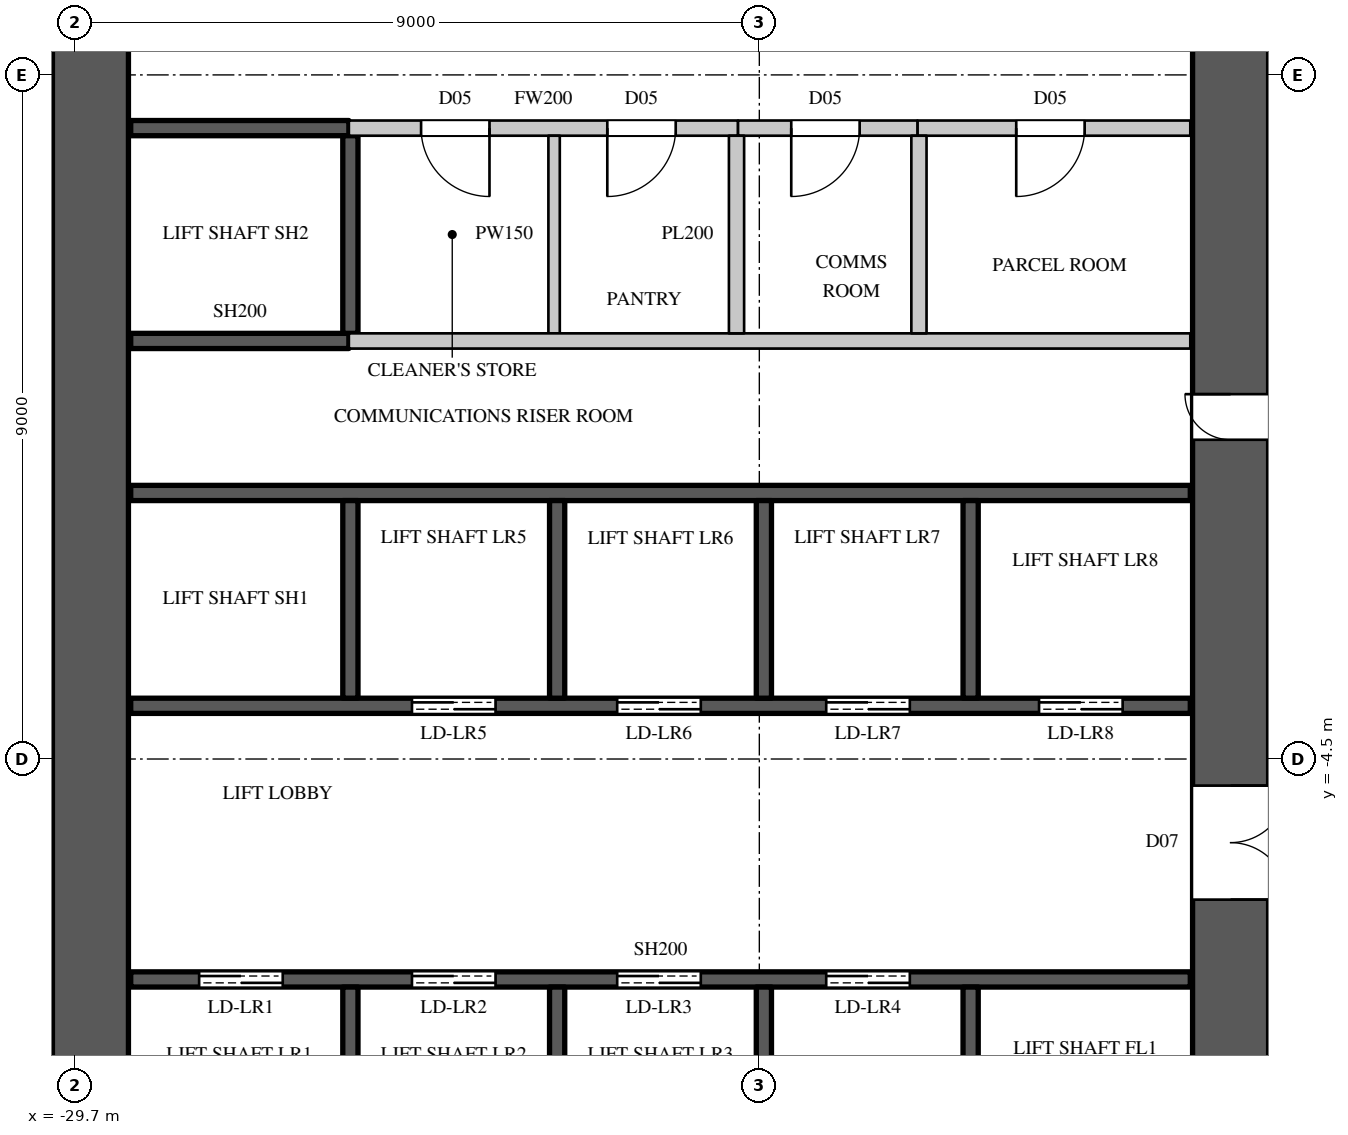
"""IFC4 building model, lengths in metres.
Left out: names, types, materials, properties, quantities, classifications, styles, units other than length and angle.
Written with IfcOpenShell. Run it as: python <this file> out.ifc"""

import sys

from ifc_helpers import new_model, si_unit, direction, frame, frame_2d, origin, place, context, subcontext, project, spatial, rectangle, extrude, element, fill, save


model = new_model("IFC4")
c1 = context("Model", 3, precision=1e-05, world=origin(), true_north=direction((0.0, 1.0)))
c2 = subcontext(c1, "Body", "Model", "MODEL_VIEW")
j1 = project(units=[si_unit("LENGTHUNIT", "METRE"), si_unit("PLANEANGLEUNIT", "RADIAN")], contexts=[c1])
p1 = place(None, origin())
s1 = spatial("IfcSite", under=j1, at=p1, CompositionType="ELEMENT")
p2 = place(p1, origin())
s2 = spatial("IfcBuilding", under=s1, at=p2, CompositionType="ELEMENT")
p3 = place(p2, frame((0.0, 0.0, 80.7)))
s3 = spatial("IfcBuildingStorey", under=s2, at=p3, CompositionType="ELEMENT", Elevation=80.7)
p4 = place(p3, frame((-14.5, -14.8, 0.0), z_axis=(0.0, 0.0, 1.0), x_axis=(0.0, 1.0, 0.0)))
e1 = element("IfcWall", 1, at=p4, inside=s3, PredefinedType="SHEAR", context=c2, shape_type="SweptSolid", body=[
    extrude(rectangle(XDim=29.6, YDim=1.0, at=frame_2d((14.8, 0.0))), origin(), (0.0, 0.0, 1.0), 3.6),
])
p5 = place(p4, frame((8.45, 0.0, 0.0)))
e2 = element("IfcOpeningElement", 2, at=p5, cuts=e1, PredefinedType="OPENING", context=c2, shape_type="SweptSolid", body=[
    extrude(rectangle(XDim=1.5, YDim=2.4, at=frame_2d((0.75, 1.2))), frame((0.0, 0.51, 0.0), z_axis=(0.0, -1.0, 0.0), x_axis=(1.0, 0.0, 0.0)), (0.0, 0.0, 1.0), 1.02),
])
p6 = place(p4, frame((19.65, 0.0, 0.0)))
e3 = element("IfcOpeningElement", 3, at=p6, cuts=e1, PredefinedType="OPENING", context=c2, shape_type="SweptSolid", body=[
    extrude(rectangle(XDim=1.5, YDim=2.4, at=frame_2d((0.75, 1.2))), frame((0.0, 0.51, 0.0), z_axis=(0.0, -1.0, 0.0), x_axis=(1.0, 0.0, 0.0)), (0.0, 0.0, 1.0), 1.02),
])
p7 = place(p4, frame((14.5, 0.0, 0.0)))
e4 = element("IfcOpeningElement", 4, at=p7, cuts=e1, PredefinedType="OPENING", context=c2, shape_type="SweptSolid", body=[
    extrude(rectangle(XDim=0.6, YDim=2.0, at=frame_2d((0.3, 1.0))), frame((0.0, 0.51, 0.0), z_axis=(0.0, -1.0, 0.0), x_axis=(1.0, 0.0, 0.0)), (0.0, 0.0, 1.0), 1.02),
])
p8 = place(p3, frame((-29.5, -10.2, 0.0), z_axis=(0.0, 0.0, 1.0), x_axis=(0.0, 1.0, 0.0)))
e5 = element("IfcWall", 5, at=p8, inside=s3, PredefinedType="SHEAR", context=c2, shape_type="SweptSolid", body=[
    extrude(rectangle(XDim=20.4, YDim=1.0, at=frame_2d((10.2, 0.0))), origin(), (0.0, 0.0, 1.0), 3.6),
])
p9 = place(p3, frame((-26.1, 3.8, 0.0), z_axis=(0.0, 0.0, 1.0), x_axis=(1.0, 0.0, 0.0)))
e6 = element("IfcWall", 6, at=p9, inside=s3, PredefinedType="PARTITIONING", context=c2, shape_type="SweptSolid", body=[
    extrude(rectangle(XDim=5.12, YDim=0.2, at=frame_2d((2.56, 0.0))), origin(), (0.0, 0.0, 1.0), 3.3),
])
p10 = place(p9, frame((0.95, 0.0, 0.0)))
e7 = element("IfcOpeningElement", 7, at=p10, cuts=e6, PredefinedType="OPENING", context=c2, shape_type="SweptSolid", body=[
    extrude(rectangle(XDim=0.9, YDim=2.2, at=frame_2d((0.45, 1.1))), frame((0.0, 0.11, 0.0), z_axis=(0.0, -1.0, 0.0), x_axis=(1.0, 0.0, 0.0)), (0.0, 0.0, 1.0), 0.22),
])
p11 = place(p9, frame((3.4, 0.0, 0.0)))
e8 = element("IfcOpeningElement", 8, at=p11, cuts=e6, PredefinedType="OPENING", context=c2, shape_type="SweptSolid", body=[
    extrude(rectangle(XDim=0.9, YDim=2.2, at=frame_2d((0.45, 1.1))), frame((0.0, 0.11, 0.0), z_axis=(0.0, -1.0, 0.0), x_axis=(1.0, 0.0, 0.0)), (0.0, 0.0, 1.0), 0.22),
])
p12 = place(p3, frame((-18.62, 3.8, 0.0), z_axis=(0.0, 0.0, 1.0), x_axis=(1.0, 0.0, 0.0)))
e9 = element("IfcWall", 9, at=p12, inside=s3, PredefinedType="PARTITIONING", context=c2, shape_type="SweptSolid", body=[
    extrude(rectangle(XDim=3.59, YDim=0.2, at=frame_2d((1.795, 0.0))), origin(), (0.0, 0.0, 1.0), 3.3),
])
p13 = place(p12, frame((1.3, 0.0, 0.0)))
e10 = element("IfcOpeningElement", 10, at=p13, cuts=e9, PredefinedType="OPENING", context=c2, shape_type="SweptSolid", body=[
    extrude(rectangle(XDim=0.9, YDim=2.2, at=frame_2d((0.45, 1.1))), frame((0.0, 0.11, 0.0), z_axis=(0.0, -1.0, 0.0), x_axis=(1.0, 0.0, 0.0)), (0.0, 0.0, 1.0), 0.22),
])
p14 = place(p3, frame((-23.4, 1.1, 0.0), z_axis=(0.0, 0.0, 1.0), x_axis=(0.0, 1.0, 0.0)))
e11 = element("IfcWall", 11, at=p14, inside=s3, PredefinedType="PARTITIONING", context=c2, shape_type="SweptSolid", body=[
    extrude(rectangle(XDim=2.6, YDim=0.15, at=frame_2d((1.3, 0.0))), origin(), (0.0, 0.0, 1.0), 3.3),
])
p15 = place(p3, frame((-26.1, 1.0, 0.0), z_axis=(0.0, 0.0, 1.0), x_axis=(1.0, 0.0, 0.0)))
e12 = element("IfcWall", 12, at=p15, inside=s3, PredefinedType="PARTITIONING", context=c2, shape_type="SweptSolid", body=[
    extrude(rectangle(XDim=11.07, YDim=0.2, at=frame_2d((5.535, 0.0))), origin(), (0.0, 0.0, 1.0), 3.3),
])
p16 = place(p3, frame((-20.98, 3.8, 0.0), z_axis=(0.0, 0.0, 1.0), x_axis=(1.0, 0.0, 0.0)))
e13 = element("IfcWall", 13, at=p16, inside=s3, PredefinedType="PARTITIONING", context=c2, shape_type="SweptSolid", body=[
    extrude(rectangle(XDim=2.36, YDim=0.2, at=frame_2d((1.18, 0.0))), origin(), (0.0, 0.0, 1.0), 3.3),
])
p17 = place(p16, frame((0.7, 0.0, 0.0)))
e14 = element("IfcOpeningElement", 14, at=p17, cuts=e13, PredefinedType="OPENING", context=c2, shape_type="SweptSolid", body=[
    extrude(rectangle(XDim=0.9, YDim=2.2, at=frame_2d((0.45, 1.1))), frame((0.0, 0.11, 0.0), z_axis=(0.0, -1.0, 0.0), x_axis=(1.0, 0.0, 0.0)), (0.0, 0.0, 1.0), 0.22),
])
for number, where, z_axis, x_axis in (
    (15, (-21.0, 1.1, 0.0), (0.0, 0.0, 1.0), (0.0, 1.0, 0.0)),
    (16, (-18.6, 1.1, 0.0), (0.0, 0.0, 1.0), (0.0, 1.0, 0.0)),
):
    element("IfcWall", number, at=place(p3, frame(where, z_axis=z_axis, x_axis=x_axis)), inside=s3, PredefinedType="PARTITIONING", context=c2, shape_type="SweptSolid", body=[
        extrude(rectangle(XDim=2.6, YDim=0.2, at=frame_2d((1.3, 0.0))), origin(), (0.0, 0.0, 1.0), 3.3),
    ])
p18 = place(p3, frame((-28.97, -7.4, 0.0), z_axis=(0.0, 0.0, 1.0), x_axis=(1.0, 0.0, 0.0)))
e17 = element("IfcWall", 17, at=p18, inside=s3, PredefinedType="SHEAR", context=c2, shape_type="SweptSolid", body=[
    extrude(rectangle(XDim=13.94, YDim=0.2, at=frame_2d((6.97, 0.0))), origin(), (0.0, 0.0, 1.0), 3.3),
])
p19 = place(p18, frame((0.9, 0.0, 0.0)))
e18 = element("IfcOpeningElement", 18, at=p19, cuts=e17, PredefinedType="OPENING", context=c2, shape_type="SweptSolid", body=[
    extrude(rectangle(XDim=1.1, YDim=2.2, at=frame_2d((0.55, 1.1))), frame((0.0, 0.11, 0.0), z_axis=(0.0, -1.0, 0.0), x_axis=(1.0, 0.0, 0.0)), (0.0, 0.0, 1.0), 0.22),
])
p20 = place(p18, frame((3.7, 0.0, 0.0)))
e19 = element("IfcOpeningElement", 19, at=p20, cuts=e17, PredefinedType="OPENING", context=c2, shape_type="SweptSolid", body=[
    extrude(rectangle(XDim=1.1, YDim=2.2, at=frame_2d((0.55, 1.1))), frame((0.0, 0.11, 0.0), z_axis=(0.0, -1.0, 0.0), x_axis=(1.0, 0.0, 0.0)), (0.0, 0.0, 1.0), 0.22),
])
p21 = place(p18, frame((6.4, 0.0, 0.0)))
e20 = element("IfcOpeningElement", 20, at=p21, cuts=e17, PredefinedType="OPENING", context=c2, shape_type="SweptSolid", body=[
    extrude(rectangle(XDim=1.1, YDim=2.2, at=frame_2d((0.55, 1.1))), frame((0.0, 0.11, 0.0), z_axis=(0.0, -1.0, 0.0), x_axis=(1.0, 0.0, 0.0)), (0.0, 0.0, 1.0), 0.22),
])
p22 = place(p18, frame((9.15, 0.0, 0.0)))
e21 = element("IfcOpeningElement", 21, at=p22, cuts=e17, PredefinedType="OPENING", context=c2, shape_type="SweptSolid", body=[
    extrude(rectangle(XDim=1.1, YDim=2.2, at=frame_2d((0.55, 1.1))), frame((0.0, 0.11, 0.0), z_axis=(0.0, -1.0, 0.0), x_axis=(1.0, 0.0, 0.0)), (0.0, 0.0, 1.0), 0.22),
])
p23 = place(p3, frame((-28.97, -3.8, 0.0), z_axis=(0.0, 0.0, 1.0), x_axis=(1.0, 0.0, 0.0)))
e22 = element("IfcWall", 22, at=p23, inside=s3, PredefinedType="SHEAR", context=c2, shape_type="SweptSolid", body=[
    extrude(rectangle(XDim=13.94, YDim=0.2, at=frame_2d((6.97, 0.0))), origin(), (0.0, 0.0, 1.0), 3.3),
])
p24 = place(p23, frame((3.7, 0.0, 0.0)))
e23 = element("IfcOpeningElement", 23, at=p24, cuts=e22, PredefinedType="OPENING", context=c2, shape_type="SweptSolid", body=[
    extrude(rectangle(XDim=1.1, YDim=2.2, at=frame_2d((0.55, 1.1))), frame((0.0, 0.11, 0.0), z_axis=(0.0, -1.0, 0.0), x_axis=(1.0, 0.0, 0.0)), (0.0, 0.0, 1.0), 0.22),
])
p25 = place(p23, frame((6.4, 0.0, 0.0)))
e24 = element("IfcOpeningElement", 24, at=p25, cuts=e22, PredefinedType="OPENING", context=c2, shape_type="SweptSolid", body=[
    extrude(rectangle(XDim=1.1, YDim=2.2, at=frame_2d((0.55, 1.1))), frame((0.0, 0.11, 0.0), z_axis=(0.0, -1.0, 0.0), x_axis=(1.0, 0.0, 0.0)), (0.0, 0.0, 1.0), 0.22),
])
p26 = place(p23, frame((9.15, 0.0, 0.0)))
e25 = element("IfcOpeningElement", 25, at=p26, cuts=e22, PredefinedType="OPENING", context=c2, shape_type="SweptSolid", body=[
    extrude(rectangle(XDim=1.1, YDim=2.2, at=frame_2d((0.55, 1.1))), frame((0.0, 0.11, 0.0), z_axis=(0.0, -1.0, 0.0), x_axis=(1.0, 0.0, 0.0)), (0.0, 0.0, 1.0), 0.22),
])
p27 = place(p23, frame((11.95, 0.0, 0.0)))
e26 = element("IfcOpeningElement", 26, at=p27, cuts=e22, PredefinedType="OPENING", context=c2, shape_type="SweptSolid", body=[
    extrude(rectangle(XDim=1.1, YDim=2.2, at=frame_2d((0.55, 1.1))), frame((0.0, 0.11, 0.0), z_axis=(0.0, -1.0, 0.0), x_axis=(1.0, 0.0, 0.0)), (0.0, 0.0, 1.0), 0.22),
])
p28 = place(p3, frame((-28.97, -1.0, 0.0), z_axis=(0.0, 0.0, 1.0), x_axis=(1.0, 0.0, 0.0)))
e27 = element("IfcWall", 27, at=p28, inside=s3, PredefinedType="SHEAR", context=c2, shape_type="SweptSolid", body=[
    extrude(rectangle(XDim=13.94, YDim=0.2, at=frame_2d((6.97, 0.0))), origin(), (0.0, 0.0, 1.0), 3.3),
])
for number, where, z_axis, x_axis in (
    (28, (-28.97, 1.0, 0.0), (0.0, 0.0, 1.0), (1.0, 0.0, 0.0)),
    (29, (-28.97, 3.8, 0.0), (0.0, 0.0, 1.0), (1.0, 0.0, 0.0)),
):
    element("IfcWall", number, at=place(p3, frame(where, z_axis=z_axis, x_axis=x_axis)), inside=s3, PredefinedType="SHEAR", context=c2, shape_type="SweptSolid", body=[
        extrude(rectangle(XDim=2.87, YDim=0.2, at=frame_2d((1.435, 0.0))), origin(), (0.0, 0.0, 1.0), 3.3),
    ])
p29 = place(p3, frame((-26.08, -10.075, 0.0), z_axis=(0.0, 0.0, 1.0), x_axis=(0.0, 1.0, 0.0)))
e30 = element("IfcWall", 30, at=p29, inside=s3, PredefinedType="SHEAR", context=c2, shape_type="SweptSolid", body=[
    extrude(rectangle(XDim=2.575, YDim=0.2, at=frame_2d((1.288, 0.0))), origin(), (0.0, 0.0, 1.0), 3.6),
])
p30 = place(p3, frame((-26.08, -3.7, 0.0), z_axis=(0.0, 0.0, 1.0), x_axis=(0.0, 1.0, 0.0)))
e31 = element("IfcWall", 31, at=p30, inside=s3, PredefinedType="SHEAR", context=c2, shape_type="SweptSolid", body=[
    extrude(rectangle(XDim=2.6, YDim=0.2, at=frame_2d((1.3, 0.0))), origin(), (0.0, 0.0, 1.0), 3.6),
])
p31 = place(p3, frame((-26.08, 1.1, 0.0), z_axis=(0.0, 0.0, 1.0), x_axis=(0.0, 1.0, 0.0)))
e32 = element("IfcWall", 32, at=p31, inside=s3, PredefinedType="SHEAR", context=c2, shape_type="SweptSolid", body=[
    extrude(rectangle(XDim=2.6, YDim=0.2, at=frame_2d((1.3, 0.0))), origin(), (0.0, 0.0, 1.0), 3.3),
])
p32 = place(p3, frame((-23.36, -10.075, 0.0), z_axis=(0.0, 0.0, 1.0), x_axis=(0.0, 1.0, 0.0)))
e33 = element("IfcWall", 33, at=p32, inside=s3, PredefinedType="SHEAR", context=c2, shape_type="SweptSolid", body=[
    extrude(rectangle(XDim=2.575, YDim=0.2, at=frame_2d((1.288, 0.0))), origin(), (0.0, 0.0, 1.0), 3.6),
])
p33 = place(p3, frame((-23.36, -3.7, 0.0), z_axis=(0.0, 0.0, 1.0), x_axis=(0.0, 1.0, 0.0)))
e34 = element("IfcWall", 34, at=p33, inside=s3, PredefinedType="SHEAR", context=c2, shape_type="SweptSolid", body=[
    extrude(rectangle(XDim=2.6, YDim=0.2, at=frame_2d((1.3, 0.0))), origin(), (0.0, 0.0, 1.0), 3.6),
])
p34 = place(p3, frame((-20.64, -10.075, 0.0), z_axis=(0.0, 0.0, 1.0), x_axis=(0.0, 1.0, 0.0)))
e35 = element("IfcWall", 35, at=p34, inside=s3, PredefinedType="SHEAR", context=c2, shape_type="SweptSolid", body=[
    extrude(rectangle(XDim=2.575, YDim=0.2, at=frame_2d((1.288, 0.0))), origin(), (0.0, 0.0, 1.0), 3.6),
])
p35 = place(p3, frame((-20.64, -3.7, 0.0), z_axis=(0.0, 0.0, 1.0), x_axis=(0.0, 1.0, 0.0)))
e36 = element("IfcWall", 36, at=p35, inside=s3, PredefinedType="SHEAR", context=c2, shape_type="SweptSolid", body=[
    extrude(rectangle(XDim=2.6, YDim=0.2, at=frame_2d((1.3, 0.0))), origin(), (0.0, 0.0, 1.0), 3.6),
])
p36 = place(p3, frame((-17.92, -10.1, 0.0), z_axis=(0.0, 0.0, 1.0), x_axis=(0.0, 1.0, 0.0)))
e37 = element("IfcWall", 37, at=p36, inside=s3, PredefinedType="SHEAR", context=c2, shape_type="SweptSolid", body=[
    extrude(rectangle(XDim=2.6, YDim=0.2, at=frame_2d((1.3, 0.0))), origin(), (0.0, 0.0, 1.0), 3.6),
])
p37 = place(p3, frame((-17.92, -3.7, 0.0), z_axis=(0.0, 0.0, 1.0), x_axis=(0.0, 1.0, 0.0)))
e38 = element("IfcWall", 38, at=p37, inside=s3, PredefinedType="SHEAR", context=c2, shape_type="SweptSolid", body=[
    extrude(rectangle(XDim=2.6, YDim=0.2, at=frame_2d((1.3, 0.0))), origin(), (0.0, 0.0, 1.0), 3.6),
])
p38 = place(p10, origin())
e39 = element("IfcDoor", 39, at=p38, inside=s3, OperationType="SINGLE_SWING_LEFT", PredefinedType="DOOR", context=c2, shape_type="SweptSolid", body=[
    extrude(rectangle(XDim=0.9, YDim=2.2, at=frame_2d((0.45, 1.1))), frame((0.0, 0.025, 0.0), z_axis=(0.0, -1.0, 0.0), x_axis=(1.0, 0.0, 0.0)), (0.0, 0.0, 1.0), 0.05),
])
fill(e7, e39)
p39 = place(p11, origin())
e40 = element("IfcDoor", 40, at=p39, inside=s3, OperationType="SINGLE_SWING_RIGHT", PredefinedType="DOOR", context=c2, shape_type="SweptSolid", body=[
    extrude(rectangle(XDim=0.9, YDim=2.2, at=frame_2d((0.45, 1.1))), frame((0.0, 0.025, 0.0), z_axis=(0.0, -1.0, 0.0), x_axis=(1.0, 0.0, 0.0)), (0.0, 0.0, 1.0), 0.05),
])
fill(e8, e40)
p40 = place(p17, origin())
e41 = element("IfcDoor", 41, at=p40, inside=s3, OperationType="SINGLE_SWING_RIGHT", PredefinedType="DOOR", context=c2, shape_type="SweptSolid", body=[
    extrude(rectangle(XDim=0.9, YDim=2.2, at=frame_2d((0.45, 1.1))), frame((0.0, 0.025, 0.0), z_axis=(0.0, -1.0, 0.0), x_axis=(1.0, 0.0, 0.0)), (0.0, 0.0, 1.0), 0.05),
])
fill(e14, e41)
p41 = place(p13, origin())
e42 = element("IfcDoor", 42, at=p41, inside=s3, OperationType="SINGLE_SWING_RIGHT", PredefinedType="DOOR", context=c2, shape_type="SweptSolid", body=[
    extrude(rectangle(XDim=0.9, YDim=2.2, at=frame_2d((0.45, 1.1))), frame((0.0, 0.025, 0.0), z_axis=(0.0, -1.0, 0.0), x_axis=(1.0, 0.0, 0.0)), (0.0, 0.0, 1.0), 0.05),
])
fill(e10, e42)
p42 = place(p19, origin())
e43 = element("IfcDoor", 43, at=p42, inside=s3, OperationType="DOUBLE_DOOR_SLIDING", PredefinedType="DOOR", context=c2, shape_type="SweptSolid", body=[
    extrude(rectangle(XDim=1.1, YDim=2.2, at=frame_2d((0.55, 1.1))), frame((0.0, 0.025, 0.0), z_axis=(0.0, -1.0, 0.0), x_axis=(1.0, 0.0, 0.0)), (0.0, 0.0, 1.0), 0.05),
])
fill(e18, e43)
p43 = place(p20, origin())
e44 = element("IfcDoor", 44, at=p43, inside=s3, OperationType="DOUBLE_DOOR_SLIDING", PredefinedType="DOOR", context=c2, shape_type="SweptSolid", body=[
    extrude(rectangle(XDim=1.1, YDim=2.2, at=frame_2d((0.55, 1.1))), frame((0.0, 0.025, 0.0), z_axis=(0.0, -1.0, 0.0), x_axis=(1.0, 0.0, 0.0)), (0.0, 0.0, 1.0), 0.05),
])
fill(e19, e44)
p44 = place(p21, origin())
e45 = element("IfcDoor", 45, at=p44, inside=s3, OperationType="DOUBLE_DOOR_SLIDING", PredefinedType="DOOR", context=c2, shape_type="SweptSolid", body=[
    extrude(rectangle(XDim=1.1, YDim=2.2, at=frame_2d((0.55, 1.1))), frame((0.0, 0.025, 0.0), z_axis=(0.0, -1.0, 0.0), x_axis=(1.0, 0.0, 0.0)), (0.0, 0.0, 1.0), 0.05),
])
fill(e20, e45)
p45 = place(p22, origin())
e46 = element("IfcDoor", 46, at=p45, inside=s3, OperationType="DOUBLE_DOOR_SLIDING", PredefinedType="DOOR", context=c2, shape_type="SweptSolid", body=[
    extrude(rectangle(XDim=1.1, YDim=2.2, at=frame_2d((0.55, 1.1))), frame((0.0, 0.025, 0.0), z_axis=(0.0, -1.0, 0.0), x_axis=(1.0, 0.0, 0.0)), (0.0, 0.0, 1.0), 0.05),
])
fill(e21, e46)
p46 = place(p24, origin())
e47 = element("IfcDoor", 47, at=p46, inside=s3, OperationType="DOUBLE_DOOR_SLIDING", PredefinedType="DOOR", context=c2, shape_type="SweptSolid", body=[
    extrude(rectangle(XDim=1.1, YDim=2.2, at=frame_2d((0.55, 1.1))), frame((0.0, 0.025, 0.0), z_axis=(0.0, -1.0, 0.0), x_axis=(1.0, 0.0, 0.0)), (0.0, 0.0, 1.0), 0.05),
])
fill(e23, e47)
p47 = place(p25, origin())
e48 = element("IfcDoor", 48, at=p47, inside=s3, OperationType="DOUBLE_DOOR_SLIDING", PredefinedType="DOOR", context=c2, shape_type="SweptSolid", body=[
    extrude(rectangle(XDim=1.1, YDim=2.2, at=frame_2d((0.55, 1.1))), frame((0.0, 0.025, 0.0), z_axis=(0.0, -1.0, 0.0), x_axis=(1.0, 0.0, 0.0)), (0.0, 0.0, 1.0), 0.05),
])
fill(e24, e48)
p48 = place(p26, origin())
e49 = element("IfcDoor", 49, at=p48, inside=s3, OperationType="DOUBLE_DOOR_SLIDING", PredefinedType="DOOR", context=c2, shape_type="SweptSolid", body=[
    extrude(rectangle(XDim=1.1, YDim=2.2, at=frame_2d((0.55, 1.1))), frame((0.0, 0.025, 0.0), z_axis=(0.0, -1.0, 0.0), x_axis=(1.0, 0.0, 0.0)), (0.0, 0.0, 1.0), 0.05),
])
fill(e25, e49)
p49 = place(p27, origin())
e50 = element("IfcDoor", 50, at=p49, inside=s3, OperationType="DOUBLE_DOOR_SLIDING", PredefinedType="DOOR", context=c2, shape_type="SweptSolid", body=[
    extrude(rectangle(XDim=1.1, YDim=2.2, at=frame_2d((0.55, 1.1))), frame((0.0, 0.025, 0.0), z_axis=(0.0, -1.0, 0.0), x_axis=(1.0, 0.0, 0.0)), (0.0, 0.0, 1.0), 0.05),
])
fill(e26, e50)
p50 = place(p5, origin())
e51 = element("IfcDoor", 51, at=p50, inside=s3, OperationType="DOUBLE_DOOR_SINGLE_SWING", PredefinedType="DOOR", context=c2, shape_type="SweptSolid", body=[
    extrude(rectangle(XDim=1.5, YDim=2.4, at=frame_2d((0.75, 1.2))), frame((0.0, -0.445, 0.0), z_axis=(0.0, -1.0, 0.0), x_axis=(1.0, 0.0, 0.0)), (0.0, 0.0, 1.0), 0.05),
])
fill(e2, e51)
p51 = place(p7, origin())
e52 = element("IfcDoor", 52, at=p51, inside=s3, OperationType="SINGLE_SWING_RIGHT", PredefinedType="DOOR", context=c2, shape_type="SweptSolid", body=[
    extrude(rectangle(XDim=0.6, YDim=2.0, at=frame_2d((0.3, 1.0))), frame((0.0, 0.495, 0.0), z_axis=(0.0, -1.0, 0.0), x_axis=(1.0, 0.0, 0.0)), (0.0, 0.0, 1.0), 0.05),
])
fill(e4, e52)
save(model, sys.argv[1])
